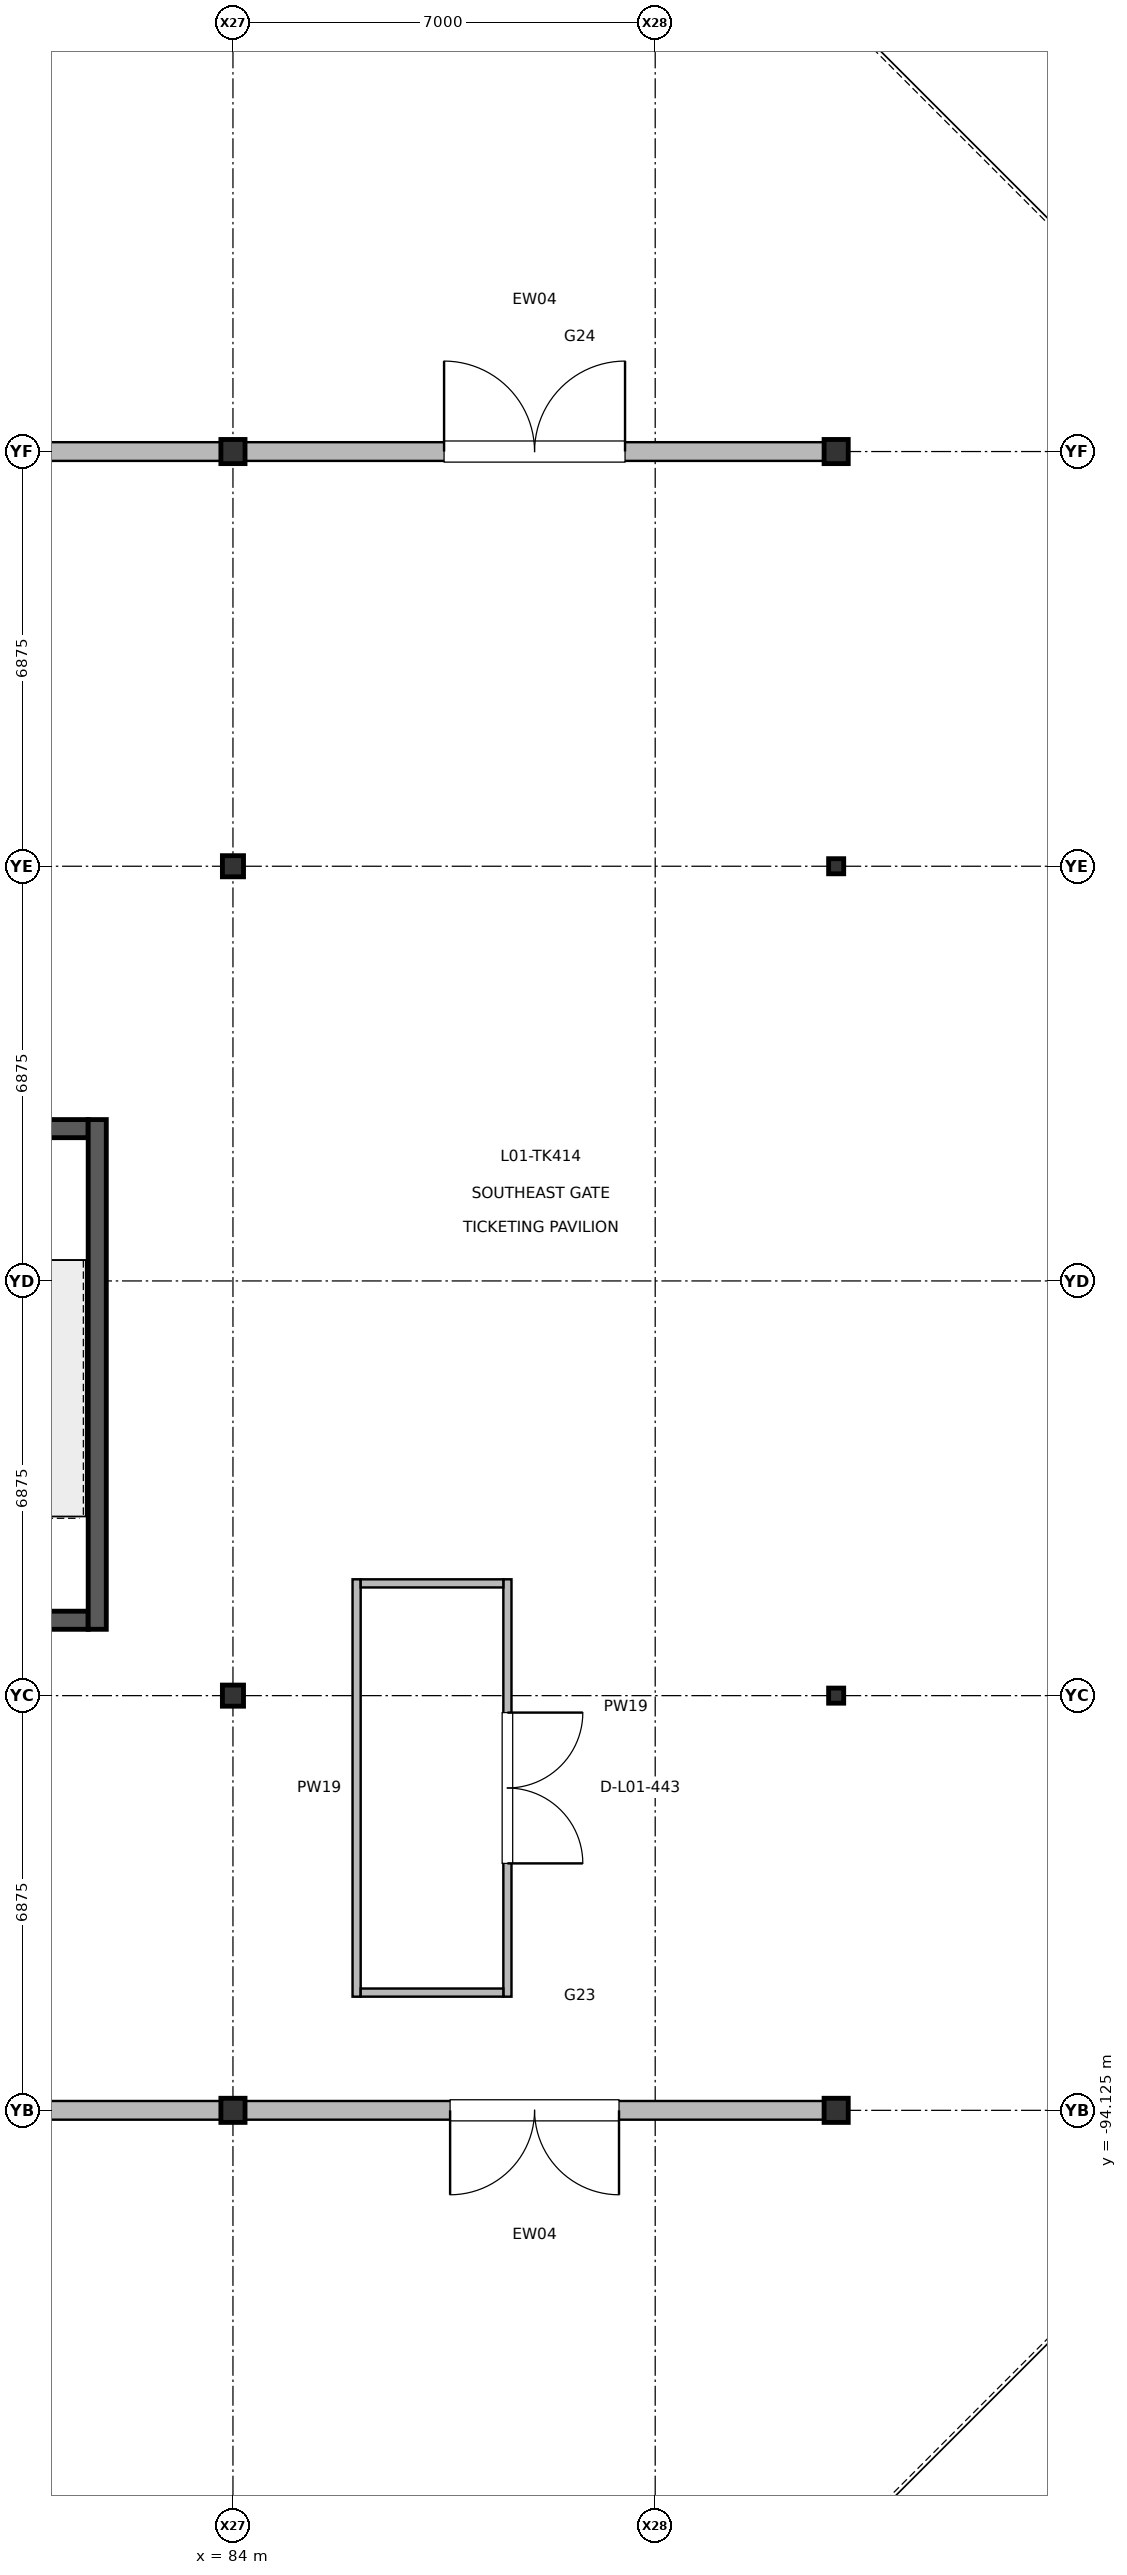
"""IFC4 building model, lengths in metres.
Left out: names, types, materials, properties, quantities, classifications, styles, units other than length and angle.
Written with IfcOpenShell. Run it as: python <this file> out.ifc"""

import sys

from ifc_helpers import new_model, si_unit, direction, frame, frame_2d, origin, origin_2d, place, context, subcontext, project, spatial, rectangle, i_section, extrude, element, fill, save


model = new_model("IFC4")
c1 = context("Model", 3, precision=1e-05, world=origin(), true_north=direction((0.0, 1.0)))
c2 = subcontext(c1, "Body", "Model", "MODEL_VIEW")
j1 = project(units=[si_unit("LENGTHUNIT", "METRE"), si_unit("PLANEANGLEUNIT", "RADIAN")], contexts=[c1])
p1 = place(None, origin())
s1 = spatial("IfcSite", under=j1, at=p1, CompositionType="ELEMENT")
p2 = place(p1, origin())
s2 = spatial("IfcBuilding", under=s1, at=p2, CompositionType="ELEMENT")
p3 = place(p2, origin())
s3 = spatial("IfcBuildingStorey", under=s2, at=p3, CompositionType="ELEMENT", Elevation=0.0)
p4 = place(p3, frame((84.0, -94.125, 0.0), z_axis=(0.0, 0.0, 1.0), x_axis=(1.0, 0.0, 0.0)))
e1 = element("IfcColumn", 1, at=p4, inside=s3, PredefinedType="COLUMN", context=c2, shape_type="SweptSolid", body=[
    extrude(i_section(OverallWidth=0.4, OverallDepth=0.4, WebThickness=0.013, FlangeThickness=0.021, at=origin_2d()), origin(), (0.0, 0.0, 1.0), 5.998),
])
for number, where, z_axis, x_axis in (
    (2, (84.0, -87.25, 0.0), (0.0, 0.0, 1.0), (1.0, 0.0, 0.0)),
    (3, (84.0, -73.5, 0.0), (0.0, 0.0, 1.0), (1.0, 0.0, 0.0)),
):
    element("IfcColumn", number, at=place(p3, frame(where, z_axis=z_axis, x_axis=x_axis)), inside=s3, PredefinedType="COLUMN", context=c2, shape_type="SweptSolid", body=[
        extrude(i_section(OverallWidth=0.35, OverallDepth=0.35, WebThickness=0.012, FlangeThickness=0.019, at=origin_2d()), origin(), (0.0, 0.0, 1.0), 5.998),
    ])
for number, where, z_axis, x_axis in (
    (4, (84.0, -66.625, 0.0), (0.0, 0.0, 1.0), (1.0, 0.0, 0.0)),
    (5, (94.0, -94.125, 0.0), (0.0, 0.0, 1.0), (1.0, 0.0, 0.0)),
):
    element("IfcColumn", number, at=place(p3, frame(where, z_axis=z_axis, x_axis=x_axis)), inside=s3, PredefinedType="COLUMN", context=c2, shape_type="SweptSolid", body=[
        extrude(i_section(OverallWidth=0.4, OverallDepth=0.4, WebThickness=0.013, FlangeThickness=0.021, at=origin_2d()), origin(), (0.0, 0.0, 1.0), 5.998),
    ])
for number, where, z_axis, x_axis in (
    (6, (94.0, -87.25, 0.0), (0.0, 0.0, 1.0), (1.0, 0.0, 0.0)),
    (7, (94.0, -73.5, 0.0), (0.0, 0.0, 1.0), (1.0, 0.0, 0.0)),
):
    element("IfcColumn", number, at=place(p3, frame(where, z_axis=z_axis, x_axis=x_axis)), inside=s3, PredefinedType="COLUMN", context=c2, shape_type="SweptSolid", body=[
        extrude(i_section(OverallWidth=0.25, OverallDepth=0.25, WebThickness=0.009, FlangeThickness=0.014, at=origin_2d()), origin(), (0.0, 0.0, 1.0), 5.998),
    ])
p5 = place(p3, frame((94.0, -66.625, 0.0), z_axis=(0.0, 0.0, 1.0), x_axis=(1.0, 0.0, 0.0)))
e8 = element("IfcColumn", 8, at=p5, inside=s3, PredefinedType="COLUMN", context=c2, shape_type="SweptSolid", body=[
    extrude(i_section(OverallWidth=0.4, OverallDepth=0.4, WebThickness=0.013, FlangeThickness=0.021, at=origin_2d()), origin(), (0.0, 0.0, 1.0), 5.998),
])
p6 = place(p3, frame((83.81, -94.125, 0.0), z_axis=(0.0, 0.0, 1.0), x_axis=(-1.0, 0.0, 0.0)))
e9 = element("IfcWall", 9, at=p6, inside=s3, PredefinedType="SOLIDWALL", context=c2, shape_type="SweptSolid", body=[
    extrude(rectangle(XDim=13.62, YDim=0.31, at=frame_2d((6.81, 0.0))), origin(), (0.0, 0.0, 1.0), 4.175),
])
p7 = place(p6, frame((5.41, 0.0, 0.0)))
e10 = element("IfcOpeningElement", 10, at=p7, cuts=e9, PredefinedType="OPENING", context=c2, shape_type="SweptSolid", body=[
    extrude(rectangle(XDim=2.8, YDim=2.6, at=frame_2d((1.4, 1.3))), frame((0.0, 0.165, 0.0), z_axis=(0.0, -1.0, 0.0), x_axis=(1.0, 0.0, 0.0)), (0.0, 0.0, 1.0), 0.33),
])
p8 = place(p3, frame((70.19, -66.625, 0.0), z_axis=(0.0, 0.0, 1.0), x_axis=(1.0, 0.0, 0.0)))
e11 = element("IfcWall", 11, at=p8, inside=s3, PredefinedType="SOLIDWALL", context=c2, shape_type="SweptSolid", body=[
    extrude(rectangle(XDim=13.62, YDim=0.31, at=frame_2d((6.81, 0.0))), origin(), (0.0, 0.0, 1.0), 3.975),
])
p9 = place(p8, frame((5.31, 0.0, 0.0)))
e12 = element("IfcOpeningElement", 12, at=p9, cuts=e11, PredefinedType="OPENING", context=c2, shape_type="SweptSolid", body=[
    extrude(rectangle(XDim=3.0, YDim=2.65, at=frame_2d((1.5, 1.325))), frame((0.0, 0.165, 0.0), z_axis=(0.0, -1.0, 0.0), x_axis=(1.0, 0.0, 0.0)), (0.0, 0.0, 1.0), 0.33),
])
p10 = place(p3, frame((93.81, -94.125, 0.0), z_axis=(0.0, 0.0, 1.0), x_axis=(-1.0, 0.0, 0.0)))
e13 = element("IfcWall", 13, at=p10, inside=s3, PredefinedType="SOLIDWALL", context=c2, shape_type="SweptSolid", body=[
    extrude(rectangle(XDim=9.62, YDim=0.31, at=frame_2d((4.81, 0.0))), origin(), (0.0, 0.0, 1.0), 4.175),
])
p11 = place(p10, frame((3.41, 0.0, 0.0)))
e14 = element("IfcOpeningElement", 14, at=p11, cuts=e13, PredefinedType="OPENING", context=c2, shape_type="SweptSolid", body=[
    extrude(rectangle(XDim=2.8, YDim=2.6, at=frame_2d((1.4, 1.3))), frame((0.0, 0.165, 0.0), z_axis=(0.0, -1.0, 0.0), x_axis=(1.0, 0.0, 0.0)), (0.0, 0.0, 1.0), 0.33),
])
p12 = place(p3, frame((84.19, -66.625, 0.0), z_axis=(0.0, 0.0, 1.0), x_axis=(1.0, 0.0, 0.0)))
e15 = element("IfcWall", 15, at=p12, inside=s3, PredefinedType="SOLIDWALL", context=c2, shape_type="SweptSolid", body=[
    extrude(rectangle(XDim=9.62, YDim=0.31, at=frame_2d((4.81, 0.0))), origin(), (0.0, 0.0, 1.0), 3.975),
])
p13 = place(p12, frame((3.31, 0.0, 0.0)))
e16 = element("IfcOpeningElement", 16, at=p13, cuts=e15, PredefinedType="OPENING", context=c2, shape_type="SweptSolid", body=[
    extrude(rectangle(XDim=3.0, YDim=2.65, at=frame_2d((1.5, 1.325))), frame((0.0, 0.165, 0.0), z_axis=(0.0, -1.0, 0.0), x_axis=(1.0, 0.0, 0.0)), (0.0, 0.0, 1.0), 0.33),
])
p14 = place(p3, frame((88.55, -85.321, 0.0), z_axis=(0.0, 0.0, 1.0), x_axis=(0.0, -1.0, 0.0)))
e17 = element("IfcWall", 17, at=p14, inside=s3, PredefinedType="PARTITIONING", context=c2, shape_type="SweptSolid", body=[
    extrude(rectangle(XDim=6.92, YDim=0.135, at=frame_2d((3.46, 0.0))), origin(), (0.0, 0.0, 1.0), 5.02),
])
p15 = place(p14, frame((2.21, 0.0, 0.0)))
e18 = element("IfcOpeningElement", 18, at=p15, cuts=e17, PredefinedType="OPENING", context=c2, shape_type="SweptSolid", body=[
    extrude(rectangle(XDim=2.5, YDim=2.5, at=frame_2d((1.25, 1.25))), frame((0.0, 0.077, 0.0), z_axis=(0.0, -1.0, 0.0), x_axis=(1.0, 0.0, 0.0)), (0.0, 0.0, 1.0), 0.155),
])
p16 = place(p3, frame((86.05, -92.241, 0.0), z_axis=(0.0, 0.0, 1.0), x_axis=(0.0, 1.0, 0.0)))
e19 = element("IfcWall", 19, at=p16, inside=s3, PredefinedType="PARTITIONING", context=c2, shape_type="SweptSolid", body=[
    extrude(rectangle(XDim=6.92, YDim=0.135, at=frame_2d((3.46, 0.0))), origin(), (0.0, 0.0, 1.0), 5.02),
])
for number, where, z_axis, x_axis in (
    (20, (86.118, -92.173, 0.0), (0.0, 0.0, 1.0), (1.0, 0.0, 0.0)),
    (21, (86.118, -85.389, 0.0), (0.0, 0.0, 1.0), (1.0, 0.0, 0.0)),
):
    element("IfcWall", number, at=place(p3, frame(where, z_axis=z_axis, x_axis=x_axis)), inside=s3, PredefinedType="PARTITIONING", context=c2, shape_type="SweptSolid", body=[
        extrude(rectangle(XDim=2.364, YDim=0.135, at=frame_2d((1.182, 0.0))), origin(), (0.0, 0.0, 1.0), 5.02),
    ])
p17 = place(p3, frame((77.4, -86.0, 0.0), z_axis=(0.0, 0.0, 1.0), x_axis=(1.0, 0.0, 0.0)))
e22 = element("IfcWall", 22, at=p17, inside=s3, PredefinedType="SHEAR", context=c2, shape_type="SweptSolid", body=[
    extrude(rectangle(XDim=4.2, YDim=0.3, at=frame_2d((2.1, 0.0))), origin(), (0.0, 0.0, 1.0), 5.8),
])
p18 = place(p17, frame((1.375, 0.0, 0.0)))
e23 = element("IfcOpeningElement", 23, at=p18, cuts=e22, PredefinedType="OPENING", context=c2, shape_type="SweptSolid", body=[
    extrude(rectangle(XDim=1.45, YDim=2.2, at=frame_2d((0.725, 1.1))), frame((0.0, 0.16, 0.0), z_axis=(0.0, -1.0, 0.0), x_axis=(1.0, 0.0, 0.0)), (0.0, 0.0, 1.0), 0.32),
])
p19 = place(p3, frame((77.4, -77.85, 0.0), z_axis=(0.0, 0.0, 1.0), x_axis=(1.0, 0.0, 0.0)))
e24 = element("IfcWall", 24, at=p19, inside=s3, PredefinedType="SHEAR", context=c2, shape_type="SweptSolid", body=[
    extrude(rectangle(XDim=4.2, YDim=0.3, at=frame_2d((2.1, 0.0))), origin(), (0.0, 0.0, 1.0), 5.8),
])
p20 = place(p3, frame((81.75, -86.15, 0.0), z_axis=(0.0, 0.0, 1.0), x_axis=(0.0, 1.0, 0.0)))
e25 = element("IfcWall", 25, at=p20, inside=s3, PredefinedType="SHEAR", context=c2, shape_type="SweptSolid", body=[
    extrude(rectangle(XDim=8.45, YDim=0.3, at=frame_2d((4.225, 0.0))), origin(), (0.0, 0.0, 1.0), 5.8),
])
p21 = place(p11, origin())
e26 = element("IfcDoor", 26, at=p21, inside=s3, OperationType="DOUBLE_DOOR_SINGLE_SWING", PredefinedType="DOOR", context=c2, shape_type="SweptSolid", body=[
    extrude(rectangle(XDim=2.8, YDim=2.6, at=frame_2d((1.4, 1.3))), frame((0.0, 0.025, 0.0), z_axis=(0.0, -1.0, 0.0), x_axis=(1.0, 0.0, 0.0)), (0.0, 0.0, 1.0), 0.05),
])
fill(e14, e26)
p22 = place(p13, origin())
e27 = element("IfcDoor", 27, at=p22, inside=s3, OperationType="DOUBLE_DOOR_SINGLE_SWING", PredefinedType="DOOR", context=c2, shape_type="SweptSolid", body=[
    extrude(rectangle(XDim=3.0, YDim=2.65, at=frame_2d((1.5, 1.325))), frame((0.0, 0.025, 0.0), z_axis=(0.0, -1.0, 0.0), x_axis=(1.0, 0.0, 0.0)), (0.0, 0.0, 1.0), 0.05),
])
fill(e16, e27)
p23 = place(p15, origin())
e28 = element("IfcDoor", 28, at=p23, inside=s3, OperationType="DOUBLE_DOOR_SINGLE_SWING", PredefinedType="DOOR", context=c2, shape_type="SweptSolid", body=[
    extrude(rectangle(XDim=2.5, YDim=2.5, at=frame_2d((1.25, 1.25))), frame((0.0, 0.025, 0.0), z_axis=(0.0, -1.0, 0.0), x_axis=(1.0, 0.0, 0.0)), (0.0, 0.0, 1.0), 0.05),
])
fill(e18, e28)
save(model, sys.argv[1])
